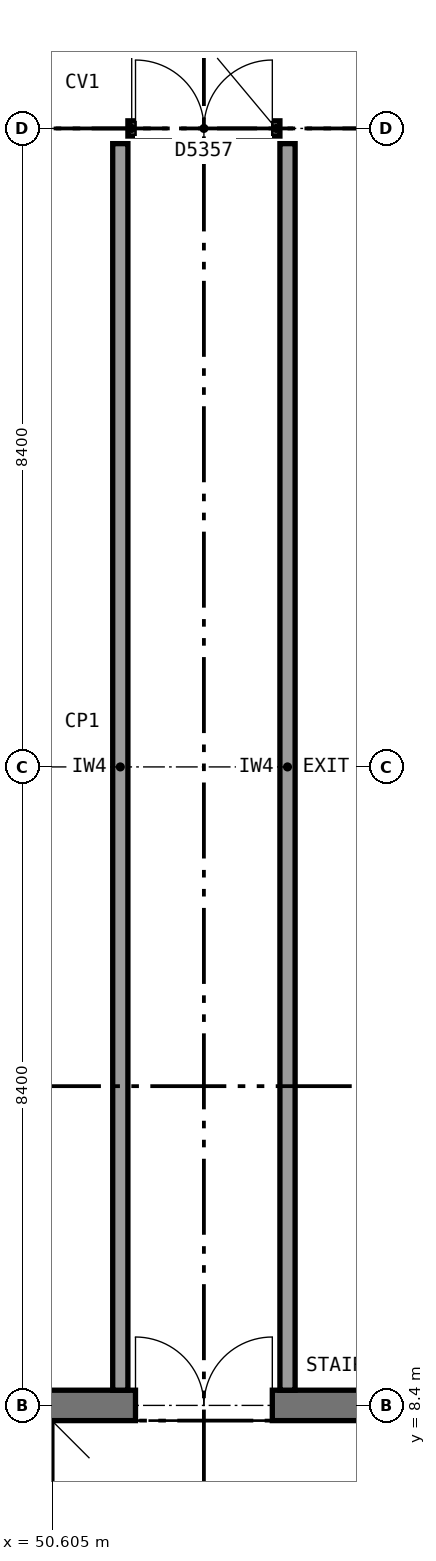
"""IFC4 building model, lengths in metres.
Left out: names, types, materials, properties, quantities, classifications, styles, units other than length and angle.
Written with IfcOpenShell. Run it as: python <this file> out.ifc"""

import sys

from ifc_helpers import new_model, si_unit, direction, frame, frame_2d, origin, place, context, subcontext, project, spatial, rectangle, extrude, element, fill, save


model = new_model("IFC4")
c1 = context("Model", 3, precision=1e-05, world=origin(), true_north=direction((0.0, 1.0)))
c2 = subcontext(c1, "Body", "Model", "MODEL_VIEW")
j1 = project(units=[si_unit("LENGTHUNIT", "METRE"), si_unit("PLANEANGLEUNIT", "RADIAN")], contexts=[c1])
p1 = place(None, origin())
s1 = spatial("IfcSite", under=j1, at=p1, CompositionType="ELEMENT")
p2 = place(p1, origin())
s2 = spatial("IfcBuilding", under=s1, at=p2, CompositionType="ELEMENT")
p3 = place(p2, origin())
s3 = spatial("IfcBuildingStorey", under=s2, at=p3, CompositionType="ELEMENT", Elevation=0.0)
p4 = place(p3, frame((50.55, 8.4, 0.0), z_axis=(0.0, 0.0, 1.0), x_axis=(1.0, 0.0, 0.0)))
e1 = element("IfcWall", 1, at=p4, inside=s3, PredefinedType="SHEAR", context=c2, shape_type="SweptSolid", body=[
    extrude(rectangle(XDim=8.1, YDim=0.4, at=frame_2d((4.05, 0.0))), origin(), (0.0, 0.0, 1.0), 5.85),
])
p5 = place(p4, frame((5.6, 0.0, 0.0)))
e2 = element("IfcOpeningElement", 2, at=p5, cuts=e1, PredefinedType="OPENING", context=c2, shape_type="SweptSolid", body=[
    extrude(rectangle(XDim=1.2, YDim=2.1, at=frame_2d((0.6, 1.05))), frame((0.0, 0.21, 0.0), z_axis=(0.0, -1.0, 0.0), x_axis=(1.0, 0.0, 0.0)), (0.0, 0.0, 1.0), 0.42),
])
p6 = place(p4, frame((1.15, 0.0, 0.0)))
e3 = element("IfcOpeningElement", 3, at=p6, cuts=e1, PredefinedType="OPENING", context=c2, shape_type="SweptSolid", body=[
    extrude(rectangle(XDim=1.8, YDim=2.1, at=frame_2d((0.9, 1.05))), frame((0.0, 0.21, 0.0), z_axis=(0.0, -1.0, 0.0), x_axis=(1.0, 0.0, 0.0)), (0.0, 0.0, 1.0), 0.42),
])
for number, where, z_axis, x_axis in (
    (4, (51.5, 8.6, 0.0), (0.0, 0.0, 1.0), (0.0, 1.0, 0.0)),
    (5, (53.7, 8.6, 0.0), (0.0, 0.0, 1.0), (0.0, 1.0, 0.0)),
):
    element("IfcWall", number, at=place(p3, frame(where, z_axis=z_axis, x_axis=x_axis)), inside=s3, PredefinedType="PARTITIONING", context=c2, shape_type="SweptSolid", body=[
        extrude(rectangle(XDim=16.4, YDim=0.2, at=frame_2d((8.2, 0.0))), origin(), (0.0, 0.0, 1.0), 5.85),
    ])
p7 = place(p3, frame((51.6, 25.2, 0.0), z_axis=(0.0, 0.0, 1.0), x_axis=(1.0, 0.0, 0.0)))
e6 = element("IfcWall", 6, at=p7, inside=s3, PredefinedType="PARTITIONING", context=c2, shape_type="SweptSolid", body=[
    extrude(rectangle(XDim=2.0, YDim=0.2, at=frame_2d((1.0, 0.0))), origin(), (0.0, 0.0, 1.0), 5.31),
])
p8 = place(p7, frame((0.1, 0.0, 0.0)))
e7 = element("IfcOpeningElement", 7, at=p8, cuts=e6, PredefinedType="OPENING", context=c2, shape_type="SweptSolid", body=[
    extrude(rectangle(XDim=1.8, YDim=2.1, at=frame_2d((0.9, 1.05))), frame((0.0, 0.11, 0.0), z_axis=(0.0, -1.0, 0.0), x_axis=(1.0, 0.0, 0.0)), (0.0, 0.0, 1.0), 0.22),
])
p9 = place(p6, origin())
e8 = element("IfcDoor", 8, at=p9, inside=s3, OperationType="DOUBLE_DOOR_SINGLE_SWING", PredefinedType="DOOR", context=c2, shape_type="SweptSolid", body=[
    extrude(rectangle(XDim=1.8, YDim=2.1, at=frame_2d((0.9, 1.05))), frame((0.0, 0.025, 0.0), z_axis=(0.0, -1.0, 0.0), x_axis=(1.0, 0.0, 0.0)), (0.0, 0.0, 1.0), 0.05),
])
fill(e3, e8)
p10 = place(p8, origin())
e9 = element("IfcDoor", 9, at=p10, inside=s3, OperationType="DOUBLE_DOOR_SINGLE_SWING", PredefinedType="DOOR", context=c2, shape_type="SweptSolid", body=[
    extrude(rectangle(XDim=1.8, YDim=2.1, at=frame_2d((0.9, 1.05))), frame((0.0, 0.025, 0.0), z_axis=(0.0, -1.0, 0.0), x_axis=(1.0, 0.0, 0.0)), (0.0, 0.0, 1.0), 0.05),
])
fill(e7, e9)
save(model, sys.argv[1])
